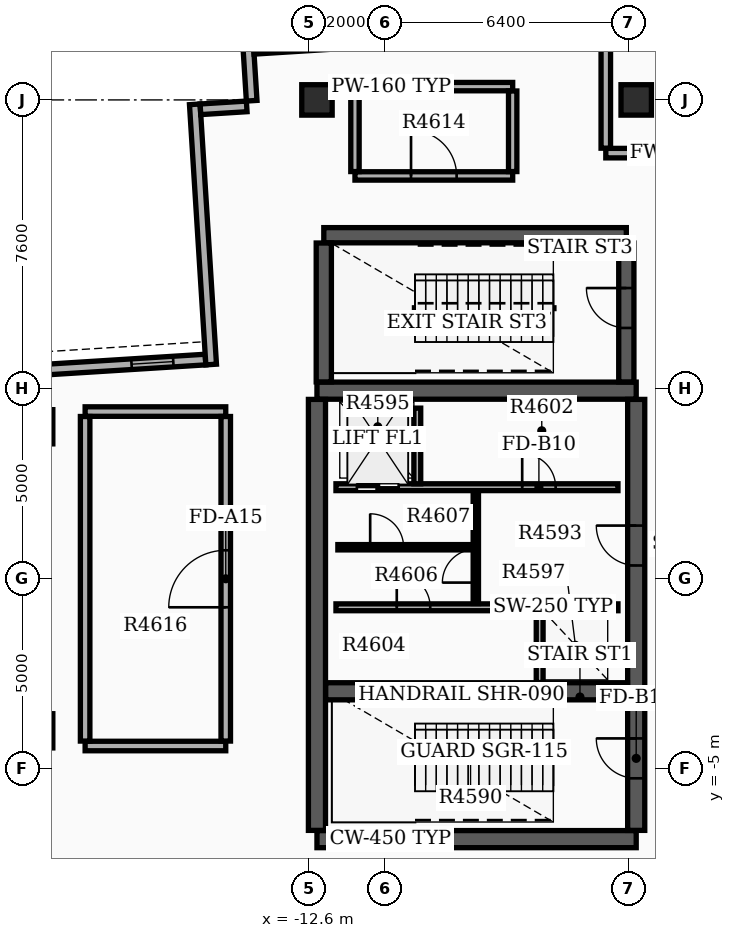
"""IFC4 building model, lengths in metres.
Left out: names, types, materials, properties, quantities, classifications, styles, units other than length and angle.
Written with IfcOpenShell. Run it as: python <this file> out.ifc"""

import sys

from ifc_helpers import new_model, si_unit, direction, frame, frame_2d, origin, origin_2d, place, context, subcontext, project, spatial, rectangle, circle, extrude, element, fill, save


model = new_model("IFC4")
c1 = context("Model", 3, precision=1e-05, world=origin(), true_north=direction((0.0, 1.0)))
c2 = subcontext(c1, "Body", "Model", "MODEL_VIEW")
j1 = project(units=[si_unit("LENGTHUNIT", "METRE"), si_unit("PLANEANGLEUNIT", "RADIAN")], contexts=[c1])
p1 = place(None, origin())
s1 = spatial("IfcSite", under=j1, at=p1, CompositionType="ELEMENT")
p2 = place(p1, origin())
s2 = spatial("IfcBuilding", under=s1, at=p2, CompositionType="ELEMENT")
p3 = place(p2, frame((0.0, 0.0, 288.9)))
s3 = spatial("IfcBuildingStorey", under=s2, at=p3, CompositionType="ELEMENT", Elevation=288.9)
for number, where, z_axis, x_axis in (
    (1, (-12.4, -6.85, 0.0), (0.0, 0.0, 1.0), (1.0, 0.0, 0.0)),
    (2, (-12.4, 4.95, 0.0), (0.0, 0.0, 1.0), (1.0, 0.0, 0.0)),
):
    element("IfcWall", number, at=place(p3, frame(where, z_axis=z_axis, x_axis=x_axis)), inside=s3, PredefinedType="SHEAR", context=c2, shape_type="SweptSolid", body=[
        extrude(rectangle(XDim=8.4, YDim=0.45, at=frame_2d((4.2, 0.0))), origin(), (0.0, 0.0, 1.0), 4.85),
    ])
p4 = place(p3, frame((-12.4, -6.62, 0.0), z_axis=(0.0, 0.0, 1.0), x_axis=(0.0, 1.0, 0.0)))
e3 = element("IfcWall", 3, at=p4, inside=s3, PredefinedType="SHEAR", context=c2, shape_type="SweptSolid", body=[
    extrude(rectangle(XDim=11.34, YDim=0.45, at=frame_2d((5.67, 0.0))), origin(), (0.0, 0.0, 1.0), 4.85),
])
p5 = place(p3, frame((-4.0, -6.62, 0.0), z_axis=(0.0, 0.0, 1.0), x_axis=(0.0, 1.0, 0.0)))
e4 = element("IfcWall", 4, at=p5, inside=s3, PredefinedType="SHEAR", context=c2, shape_type="SweptSolid", body=[
    extrude(rectangle(XDim=11.34, YDim=0.45, at=frame_2d((5.67, 0.0))), origin(), (0.0, 0.0, 1.0), 4.85),
])
p6 = place(p5, frame((1.37, 0.0, 0.0)))
e5 = element("IfcOpeningElement", 5, at=p6, cuts=e4, PredefinedType="OPENING", context=c2, shape_type="SweptSolid", body=[
    extrude(rectangle(XDim=1.05, YDim=2.15, at=frame_2d((0.525, 1.075))), frame((0.0, 0.235, 0.0), z_axis=(0.0, -1.0, 0.0), x_axis=(1.0, 0.0, 0.0)), (0.0, 0.0, 1.0), 0.47),
])
p7 = place(p5, frame((6.97, 0.0, 0.0)))
e6 = element("IfcOpeningElement", 6, at=p7, cuts=e4, PredefinedType="OPENING", context=c2, shape_type="SweptSolid", body=[
    extrude(rectangle(XDim=1.05, YDim=2.15, at=frame_2d((0.525, 1.075))), frame((0.0, 0.235, 0.0), z_axis=(0.0, -1.0, 0.0), x_axis=(1.0, 0.0, 0.0)), (0.0, 0.0, 1.0), 0.47),
])
p8 = place(p3, frame((-12.17, -2.96, 0.0), z_axis=(0.0, 0.0, 1.0), x_axis=(1.0, 0.0, 0.0)))
e7 = element("IfcWall", 7, at=p8, inside=s3, PredefinedType="SHEAR", context=c2, shape_type="SweptSolid", body=[
    extrude(rectangle(XDim=7.94, YDim=0.45, at=frame_2d((3.97, 0.0))), origin(), (0.0, 0.0, 1.0), 4.85),
])
p9 = place(p3, frame((-12.22, 9.04, 0.0), z_axis=(0.0, 0.0, 1.0), x_axis=(1.0, 0.0, 0.0)))
e8 = element("IfcWall", 8, at=p9, inside=s3, PredefinedType="SHEAR", context=c2, shape_type="SweptSolid", body=[
    extrude(rectangle(XDim=7.96, YDim=0.4, at=frame_2d((3.98, 0.0))), origin(), (0.0, 0.0, 1.0), 4.85),
])
p10 = place(p3, frame((-12.22, 5.18, 0.0), z_axis=(0.0, 0.0, 1.0), x_axis=(0.0, 1.0, 0.0)))
e9 = element("IfcWall", 9, at=p10, inside=s3, PredefinedType="SHEAR", context=c2, shape_type="SweptSolid", body=[
    extrude(rectangle(XDim=3.655, YDim=0.4, at=frame_2d((1.828, 0.0))), origin(), (0.0, 0.0, 1.0), 4.85),
])
p11 = place(p3, frame((-4.26, 5.18, 0.0), z_axis=(0.0, 0.0, 1.0), x_axis=(0.0, 1.0, 0.0)))
e10 = element("IfcWall", 10, at=p11, inside=s3, PredefinedType="SHEAR", context=c2, shape_type="SweptSolid", body=[
    extrude(rectangle(XDim=3.655, YDim=0.4, at=frame_2d((1.828, 0.0))), origin(), (0.0, 0.0, 1.0), 4.85),
])
p12 = place(p11, frame((1.42, 0.0, 0.0)))
e11 = element("IfcOpeningElement", 11, at=p12, cuts=e10, PredefinedType="OPENING", context=c2, shape_type="SweptSolid", body=[
    extrude(rectangle(XDim=1.05, YDim=2.15, at=frame_2d((0.525, 1.075))), frame((0.0, 0.21, 0.0), z_axis=(0.0, -1.0, 0.0), x_axis=(1.0, 0.0, 0.0)), (0.0, 0.0, 1.0), 0.42),
])
for number, where, z_axis, x_axis in (
    (12, (-12.4, 12.6, 0.0), (0.0, 0.0, 1.0), (1.0, 0.0, 0.0)),
    (13, (-4.0, 12.6, 0.0), (0.0, 0.0, 1.0), (1.0, 0.0, 0.0)),
):
    element("IfcColumn", number, at=place(p3, frame(where, z_axis=z_axis, x_axis=x_axis)), inside=s3, PredefinedType="COLUMN", context=c2, shape_type="SweptSolid", body=[
        extrude(rectangle(XDim=0.8, YDim=0.8, at=origin_2d()), origin(), (0.0, 0.0, 1.0), 5.1),
    ])
for number, where, z_axis, x_axis in (
    (14, (-19.8, -4.0, 0.0), (0.0, 0.0, 1.0), (1.0, 0.0, 0.0)),
    (15, (-19.8, 4.0, 0.0), (0.0, 0.0, 1.0), (1.0, 0.0, 0.0)),
):
    element("IfcColumn", number, at=place(p3, frame(where, z_axis=z_axis, x_axis=x_axis)), inside=s3, PredefinedType="COLUMN", context=c2, shape_type="SweptSolid", body=[
        extrude(circle(Radius=0.45, at=origin_2d()), origin(), (0.0, 0.0, 1.0), 5.1),
    ])
p13 = place(p3, frame((-15.333, 5.769, 0.0), z_axis=(0.0, 0.0, 1.0), x_axis=(-0.998027423805, -0.062779465852, 0.0)))
e16 = element("IfcWall", 16, at=p13, inside=s3, PredefinedType="STANDARD", context=c2, shape_type="SweptSolid", body=[
    extrude(rectangle(XDim=14.7, YDim=0.28, at=frame_2d((7.35, 0.0))), origin(), (0.0, 0.0, 1.0), 3.93),
])
p14 = place(p13, frame((0.85, 0.0, 0.95)))
e17 = element("IfcOpeningElement", 17, at=p14, cuts=e16, PredefinedType="OPENING", context=c2, shape_type="SweptSolid", body=[
    extrude(rectangle(XDim=1.1, YDim=1.2, at=frame_2d((0.55, 0.6))), frame((0.0, 0.15, 0.0), z_axis=(0.0, -1.0, 0.0), x_axis=(1.0, 0.0, 0.0)), (0.0, 0.0, 1.0), 0.3),
])
p15 = place(p3, frame((-15.184, 5.638, 0.0), z_axis=(0.0, 0.0, 1.0), x_axis=(-0.062779317195, 0.998027433156, 0.0)))
e18 = element("IfcWall", 18, at=p15, inside=s3, PredefinedType="STANDARD", context=c2, shape_type="SweptSolid", body=[
    extrude(rectangle(XDim=6.86, YDim=0.28, at=frame_2d((3.43, 0.0))), origin(), (0.0, 0.0, 1.0), 3.93),
])
p16 = place(p3, frame((-15.466, 12.353, 0.0), z_axis=(0.0, 0.0, 1.0), x_axis=(0.998024450254, 0.062826719603, 0.0)))
e19 = element("IfcWall", 19, at=p16, inside=s3, PredefinedType="STANDARD", context=c2, shape_type="SweptSolid", body=[
    extrude(rectangle(XDim=1.22, YDim=0.28, at=frame_2d((0.61, 0.0))), origin(), (0.0, 0.0, 1.0), 3.93),
])
p17 = place(p3, frame((-14.118, 12.578, 0.0), z_axis=(0.0, 0.0, 1.0), x_axis=(-0.062824119533, 0.998024613927, 0.0)))
e20 = element("IfcWall", 20, at=p17, inside=s3, PredefinedType="STANDARD", context=c2, shape_type="SweptSolid", body=[
    extrude(rectangle(XDim=1.5, YDim=0.28, at=frame_2d((0.75, 0.0))), origin(), (0.0, 0.0, 1.0), 3.93),
])
p18 = place(p3, frame((-14.063, 13.945, 0.0), z_axis=(0.0, 0.0, 1.0), x_axis=(0.998027314704, 0.062781200242, 0.0)))
e21 = element("IfcWall", 21, at=p18, inside=s3, PredefinedType="STANDARD", context=c2, shape_type="SweptSolid", body=[
    extrude(rectangle(XDim=6.3, YDim=0.28, at=frame_2d((3.15, 0.0))), origin(), (0.0, 0.0, 1.0), 3.93),
])
p19 = place(p3, frame((-11.9, 2.41, 0.0), z_axis=(0.0, 0.0, 1.0), x_axis=(1.0, 0.0, 0.0)))
e22 = element("IfcWall", 22, at=p19, inside=s3, PredefinedType="SOLIDWALL", context=c2, shape_type="SweptSolid", body=[
    extrude(rectangle(XDim=7.42, YDim=0.18, at=frame_2d((3.71, 0.0))), origin(), (0.0, 0.0, 1.0), 3.92),
])
p20 = place(p19, frame((0.55, 0.0, 0.0)))
e23 = element("IfcOpeningElement", 23, at=p20, cuts=e22, PredefinedType="OPENING", context=c2, shape_type="SweptSolid", body=[
    extrude(rectangle(XDim=1.1, YDim=2.15, at=frame_2d((0.55, 1.075))), frame((0.0, 0.1, 0.0), z_axis=(0.0, -1.0, 0.0), x_axis=(1.0, 0.0, 0.0)), (0.0, 0.0, 1.0), 0.2),
])
p21 = place(p19, frame((4.9, 0.0, 0.0)))
e24 = element("IfcOpeningElement", 24, at=p21, cuts=e22, PredefinedType="OPENING", context=c2, shape_type="SweptSolid", body=[
    extrude(rectangle(XDim=0.88, YDim=2.1, at=frame_2d((0.44, 1.05))), frame((0.0, 0.1, 0.0), z_axis=(0.0, -1.0, 0.0), x_axis=(1.0, 0.0, 0.0)), (0.0, 0.0, 1.0), 0.2),
])
p22 = place(p3, frame((-11.9, -0.75, 0.0), z_axis=(0.0, 0.0, 1.0), x_axis=(1.0, 0.0, 0.0)))
e25 = element("IfcWall", 25, at=p22, inside=s3, PredefinedType="SOLIDWALL", context=c2, shape_type="SweptSolid", body=[
    extrude(rectangle(XDim=7.42, YDim=0.18, at=frame_2d((3.71, 0.0))), origin(), (0.0, 0.0, 1.0), 3.92),
])
p23 = place(p22, frame((1.6, 0.0, 0.0)))
e26 = element("IfcOpeningElement", 26, at=p23, cuts=e25, PredefinedType="OPENING", context=c2, shape_type="SweptSolid", body=[
    extrude(rectangle(XDim=0.88, YDim=2.1, at=frame_2d((0.44, 1.05))), frame((0.0, 0.1, 0.0), z_axis=(0.0, -1.0, 0.0), x_axis=(1.0, 0.0, 0.0)), (0.0, 0.0, 1.0), 0.2),
])
p24 = place(p3, frame((-9.76, 2.5, 0.0), z_axis=(0.0, 0.0, 1.0), x_axis=(0.0, 1.0, 0.0)))
e27 = element("IfcWall", 27, at=p24, inside=s3, PredefinedType="SOLIDWALL", context=c2, shape_type="SweptSolid", body=[
    extrude(rectangle(XDim=1.99, YDim=0.18, at=frame_2d((0.995, 0.0))), origin(), (0.0, 0.0, 1.0), 3.92),
])
p25 = place(p3, frame((-6.54, -2.73, 0.0), z_axis=(0.0, 0.0, 1.0), x_axis=(0.0, 1.0, 0.0)))
e28 = element("IfcWall", 28, at=p25, inside=s3, PredefinedType="SOLIDWALL", context=c2, shape_type="SweptSolid", body=[
    extrude(rectangle(XDim=1.89, YDim=0.18, at=frame_2d((0.945, 0.0))), origin(), (0.0, 0.0, 1.0), 3.92),
])
p26 = place(p3, frame((-8.22, -0.65, 0.0), z_axis=(0.0, 0.0, 1.0), x_axis=(0.0, 1.0, 0.0)))
e29 = element("IfcWall", 29, at=p26, inside=s3, PredefinedType="SOLIDWALL", context=c2, shape_type="SweptSolid", body=[
    extrude(rectangle(XDim=2.96, YDim=0.14, at=frame_2d((1.48, 0.0))), origin(), (0.0, 0.0, 1.0), 3.92),
])
p27 = place(p26, frame((0.55, 0.0, 0.0)))
e30 = element("IfcOpeningElement", 30, at=p27, cuts=e29, PredefinedType="OPENING", context=c2, shape_type="SweptSolid", body=[
    extrude(rectangle(XDim=0.88, YDim=2.1, at=frame_2d((0.44, 1.05))), frame((0.0, 0.08, 0.0), z_axis=(0.0, -1.0, 0.0), x_axis=(1.0, 0.0, 0.0)), (0.0, 0.0, 1.0), 0.16),
])
p28 = place(p3, frame((-11.85, 0.83, 0.0), z_axis=(0.0, 0.0, 1.0), x_axis=(1.0, 0.0, 0.0)))
e31 = element("IfcWall", 31, at=p28, inside=s3, PredefinedType="PARTITIONING", context=c2, shape_type="SweptSolid", body=[
    extrude(rectangle(XDim=3.552, YDim=0.14, at=frame_2d((1.776, 0.0))), origin(), (0.0, 0.0, 1.0), 3.92),
])
p29 = place(p28, frame((0.85, 0.0, 0.0)))
e32 = element("IfcOpeningElement", 32, at=p29, cuts=e31, PredefinedType="OPENING", context=c2, shape_type="SweptSolid", body=[
    extrude(rectangle(XDim=0.88, YDim=2.1, at=frame_2d((0.44, 1.05))), frame((0.0, 0.08, 0.0), z_axis=(0.0, -1.0, 0.0), x_axis=(1.0, 0.0, 0.0)), (0.0, 0.0, 1.0), 0.16),
])
p30 = place(p3, frame((-4.8, 11.2, 0.0), z_axis=(0.0, 0.0, 1.0), x_axis=(1.0, 0.0, 0.0)))
e33 = element("IfcWall", 33, at=p30, inside=s3, PredefinedType="SOLIDWALL", context=c2, shape_type="SweptSolid", body=[
    extrude(rectangle(XDim=9.6, YDim=0.25, at=frame_2d((4.8, 0.0))), origin(), (0.0, 0.0, 1.0), 3.92),
])
p31 = place(p30, frame((4.2, 0.0, 0.0)))
e34 = element("IfcOpeningElement", 34, at=p31, cuts=e33, PredefinedType="OPENING", context=c2, shape_type="SweptSolid", body=[
    extrude(rectangle(XDim=1.2, YDim=2.15, at=frame_2d((0.6, 1.075))), frame((0.0, 0.135, 0.0), z_axis=(0.0, -1.0, 0.0), x_axis=(1.0, 0.0, 0.0)), (0.0, 0.0, 1.0), 0.27),
])
p32 = place(p3, frame((-4.8, 11.33, 0.0), z_axis=(0.0, 0.0, 1.0), x_axis=(0.0, 1.0, 0.0)))
e35 = element("IfcWall", 35, at=p32, inside=s3, PredefinedType="SOLIDWALL", context=c2, shape_type="SweptSolid", body=[
    extrude(rectangle(XDim=7.04, YDim=0.25, at=frame_2d((3.52, 0.0))), origin(), (0.0, 0.0, 1.0), 3.92),
])
p33 = place(p3, frame((-11.4, 10.6, 0.0), z_axis=(0.0, 0.0, 1.0), x_axis=(1.0, 0.0, 0.0)))
e36 = element("IfcWall", 36, at=p33, inside=s3, PredefinedType="PARTITIONING", context=c2, shape_type="SweptSolid", body=[
    extrude(rectangle(XDim=4.15, YDim=0.22, at=frame_2d((2.075, 0.0))), origin(), (0.0, 0.0, 1.0), 3.92),
])
p34 = place(p33, frame((1.475, 0.0, 0.0)))
e37 = element("IfcOpeningElement", 37, at=p34, cuts=e36, PredefinedType="OPENING", context=c2, shape_type="SweptSolid", body=[
    extrude(rectangle(XDim=1.2, YDim=2.15, at=frame_2d((0.6, 1.075))), frame((0.0, 0.12, 0.0), z_axis=(0.0, -1.0, 0.0), x_axis=(1.0, 0.0, 0.0)), (0.0, 0.0, 1.0), 0.24),
])
p35 = place(p3, frame((-11.4, 12.95, 0.0), z_axis=(0.0, 0.0, 1.0), x_axis=(1.0, 0.0, 0.0)))
e38 = element("IfcWall", 38, at=p35, inside=s3, PredefinedType="PARTITIONING", context=c2, shape_type="SweptSolid", body=[
    extrude(rectangle(XDim=4.15, YDim=0.22, at=frame_2d((2.075, 0.0))), origin(), (0.0, 0.0, 1.0), 3.92),
])
for number, where, z_axis, x_axis in (
    (39, (-11.4, 10.715, 0.0), (0.0, 0.0, 1.0), (0.0, 1.0, 0.0)),
    (40, (-7.25, 10.715, 0.0), (0.0, 0.0, 1.0), (0.0, 1.0, 0.0)),
):
    element("IfcWall", number, at=place(p3, frame(where, z_axis=z_axis, x_axis=x_axis)), inside=s3, PredefinedType="PARTITIONING", context=c2, shape_type="SweptSolid", body=[
        extrude(rectangle(XDim=2.12, YDim=0.22, at=frame_2d((1.06, 0.0))), origin(), (0.0, 0.0, 1.0), 3.92),
    ])
for number, where, z_axis, x_axis in (
    (41, (-18.5, -4.4, 0.0), (0.0, 0.0, 1.0), (1.0, 0.0, 0.0)),
    (42, (-18.5, 4.4, 0.0), (0.0, 0.0, 1.0), (1.0, 0.0, 0.0)),
):
    element("IfcWall", number, at=place(p3, frame(where, z_axis=z_axis, x_axis=x_axis)), inside=s3, PredefinedType="SOLIDWALL", context=c2, shape_type="SweptSolid", body=[
        extrude(rectangle(XDim=3.7, YDim=0.25, at=frame_2d((1.85, 0.0))), origin(), (0.0, 0.0, 1.0), 3.92),
    ])
p36 = place(p3, frame((-18.5, -4.27, 0.0), z_axis=(0.0, 0.0, 1.0), x_axis=(0.0, 1.0, 0.0)))
e43 = element("IfcWall", 43, at=p36, inside=s3, PredefinedType="SOLIDWALL", context=c2, shape_type="SweptSolid", body=[
    extrude(rectangle(XDim=8.54, YDim=0.25, at=frame_2d((4.27, 0.0))), origin(), (0.0, 0.0, 1.0), 3.92),
])
p37 = place(p3, frame((-14.8, -4.27, 0.0), z_axis=(0.0, 0.0, 1.0), x_axis=(0.0, 1.0, 0.0)))
e44 = element("IfcWall", 44, at=p37, inside=s3, PredefinedType="SOLIDWALL", context=c2, shape_type="SweptSolid", body=[
    extrude(rectangle(XDim=8.54, YDim=0.25, at=frame_2d((4.27, 0.0))), origin(), (0.0, 0.0, 1.0), 3.92),
])
p38 = place(p37, frame((3.52, 0.0, 0.0)))
e45 = element("IfcOpeningElement", 45, at=p38, cuts=e44, PredefinedType="OPENING", context=c2, shape_type="SweptSolid", body=[
    extrude(rectangle(XDim=1.5, YDim=2.15, at=frame_2d((0.75, 1.075))), frame((0.0, 0.135, 0.0), z_axis=(0.0, -1.0, 0.0), x_axis=(1.0, 0.0, 0.0)), (0.0, 0.0, 1.0), 0.27),
])
p39 = place(p14, origin())
e46 = element("IfcWindow", 46, at=p39, inside=s3, PartitioningType="SINGLE_PANEL", PredefinedType="WINDOW", context=c2, shape_type="SweptSolid", body=[
    extrude(rectangle(XDim=1.1, YDim=1.2, at=frame_2d((0.55, 0.6))), frame((0.0, 0.03, 0.0), z_axis=(0.0, -1.0, 0.0), x_axis=(1.0, 0.0, 0.0)), (0.0, 0.0, 1.0), 0.06),
])
fill(e17, e46)
p40 = place(p6, origin())
e47 = element("IfcDoor", 47, at=p40, inside=s3, OperationType="SINGLE_SWING_RIGHT", PredefinedType="DOOR", context=c2, shape_type="SweptSolid", body=[
    extrude(rectangle(XDim=1.05, YDim=2.15, at=frame_2d((0.525, 1.075))), frame((0.0, 0.025, 0.0), z_axis=(0.0, -1.0, 0.0), x_axis=(1.0, 0.0, 0.0)), (0.0, 0.0, 1.0), 0.05),
])
fill(e5, e47)
p41 = place(p7, origin())
e48 = element("IfcDoor", 48, at=p41, inside=s3, OperationType="SINGLE_SWING_RIGHT", PredefinedType="DOOR", context=c2, shape_type="SweptSolid", body=[
    extrude(rectangle(XDim=1.05, YDim=2.15, at=frame_2d((0.525, 1.075))), frame((0.0, 0.025, 0.0), z_axis=(0.0, -1.0, 0.0), x_axis=(1.0, 0.0, 0.0)), (0.0, 0.0, 1.0), 0.05),
])
fill(e6, e48)
p42 = place(p12, origin())
e49 = element("IfcDoor", 49, at=p42, inside=s3, OperationType="SINGLE_SWING_RIGHT", PredefinedType="DOOR", context=c2, shape_type="SweptSolid", body=[
    extrude(rectangle(XDim=1.05, YDim=2.15, at=frame_2d((0.525, 1.075))), frame((0.0, 0.025, 0.0), z_axis=(0.0, -1.0, 0.0), x_axis=(1.0, 0.0, 0.0)), (0.0, 0.0, 1.0), 0.05),
])
fill(e11, e49)
p43 = place(p20, origin())
e50 = element("IfcDoor", 50, at=p43, inside=s3, OperationType="DOUBLE_DOOR_SLIDING", PredefinedType="DOOR", context=c2, shape_type="SweptSolid", body=[
    extrude(rectangle(XDim=1.1, YDim=2.15, at=frame_2d((0.55, 1.075))), frame((0.0, 0.025, 0.0), z_axis=(0.0, -1.0, 0.0), x_axis=(1.0, 0.0, 0.0)), (0.0, 0.0, 1.0), 0.05),
])
fill(e23, e50)
p44 = place(p21, origin())
e51 = element("IfcDoor", 51, at=p44, inside=s3, OperationType="SINGLE_SWING_LEFT", PredefinedType="DOOR", context=c2, shape_type="SweptSolid", body=[
    extrude(rectangle(XDim=0.88, YDim=2.1, at=frame_2d((0.44, 1.05))), frame((0.0, 0.025, 0.0), z_axis=(0.0, -1.0, 0.0), x_axis=(1.0, 0.0, 0.0)), (0.0, 0.0, 1.0), 0.05),
])
fill(e24, e51)
p45 = place(p23, origin())
e52 = element("IfcDoor", 52, at=p45, inside=s3, OperationType="SINGLE_SWING_LEFT", PredefinedType="DOOR", context=c2, shape_type="SweptSolid", body=[
    extrude(rectangle(XDim=0.88, YDim=2.1, at=frame_2d((0.44, 1.05))), frame((0.0, 0.025, 0.0), z_axis=(0.0, -1.0, 0.0), x_axis=(1.0, 0.0, 0.0)), (0.0, 0.0, 1.0), 0.05),
])
fill(e26, e52)
p46 = place(p27, origin())
e53 = element("IfcDoor", 53, at=p46, inside=s3, OperationType="SINGLE_SWING_LEFT", PredefinedType="DOOR", context=c2, shape_type="SweptSolid", body=[
    extrude(rectangle(XDim=0.88, YDim=2.1, at=frame_2d((0.44, 1.05))), frame((0.0, 0.025, 0.0), z_axis=(0.0, -1.0, 0.0), x_axis=(1.0, 0.0, 0.0)), (0.0, 0.0, 1.0), 0.05),
])
fill(e30, e53)
p47 = place(p29, origin())
e54 = element("IfcDoor", 54, at=p47, inside=s3, OperationType="SINGLE_SWING_LEFT", PredefinedType="DOOR", context=c2, shape_type="SweptSolid", body=[
    extrude(rectangle(XDim=0.88, YDim=2.1, at=frame_2d((0.44, 1.05))), frame((0.0, 0.025, 0.0), z_axis=(0.0, -1.0, 0.0), x_axis=(1.0, 0.0, 0.0)), (0.0, 0.0, 1.0), 0.05),
])
fill(e32, e54)
p48 = place(p34, origin())
e55 = element("IfcDoor", 55, at=p48, inside=s3, OperationType="SINGLE_SWING_LEFT", PredefinedType="DOOR", context=c2, shape_type="SweptSolid", body=[
    extrude(rectangle(XDim=1.2, YDim=2.15, at=frame_2d((0.6, 1.075))), frame((0.0, 0.025, 0.0), z_axis=(0.0, -1.0, 0.0), x_axis=(1.0, 0.0, 0.0)), (0.0, 0.0, 1.0), 0.05),
])
fill(e37, e55)
p49 = place(p38, origin())
e56 = element("IfcDoor", 56, at=p49, inside=s3, OperationType="DOUBLE_DOOR_SINGLE_SWING", PredefinedType="DOOR", context=c2, shape_type="SweptSolid", body=[
    extrude(rectangle(XDim=1.5, YDim=2.15, at=frame_2d((0.75, 1.075))), frame((0.0, 0.025, 0.0), z_axis=(0.0, -1.0, 0.0), x_axis=(1.0, 0.0, 0.0)), (0.0, 0.0, 1.0), 0.05),
])
fill(e45, e56)
save(model, sys.argv[1])
